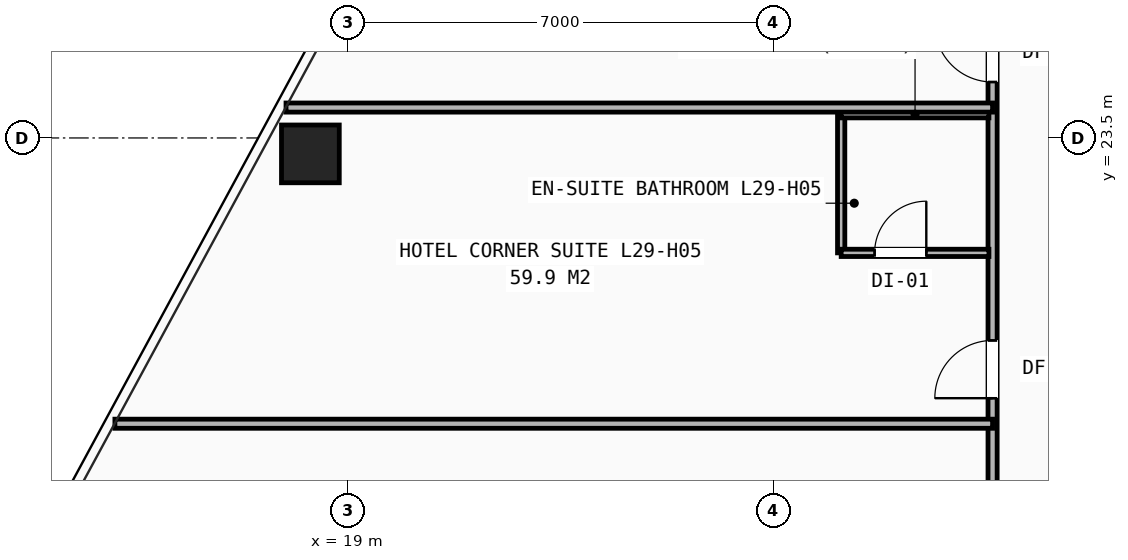
"""IFC4 building model, lengths in metres.
Left out: names, types, materials, properties, quantities, classifications, styles, units other than length and angle.
Written with IfcOpenShell. Run it as: python <this file> out.ifc"""

import sys

from ifc_helpers import new_model, si_unit, direction, frame, frame_2d, origin, origin_2d, place, context, subcontext, project, spatial, rectangle, hollow_rectangle, extrude, element, fill, save


model = new_model("IFC4")
c1 = context("Model", 3, precision=1e-05, world=origin(), true_north=direction((0.0, 1.0)))
c2 = subcontext(c1, "Body", "Model", "MODEL_VIEW")
j1 = project(units=[si_unit("LENGTHUNIT", "METRE"), si_unit("PLANEANGLEUNIT", "RADIAN")], contexts=[c1])
p1 = place(None, origin())
s1 = spatial("IfcSite", under=j1, at=p1, CompositionType="ELEMENT")
p2 = place(p1, origin())
s2 = spatial("IfcBuilding", under=s1, at=p2, CompositionType="ELEMENT")
p3 = place(p2, frame((0.0, 0.0, 102.2)))
s3 = spatial("IfcBuildingStorey", under=s2, at=p3, CompositionType="ELEMENT", Elevation=102.2)
p4 = place(p3, frame((18.381, 23.238, 0.0), z_axis=(0.0, 0.0, 1.0), x_axis=(1.0, 0.0, 0.0)))
e1 = element("IfcColumn", 1, at=p4, inside=s3, PredefinedType="COLUMN", context=c2, shape_type="SweptSolid", body=[
    extrude(hollow_rectangle(XDim=0.95, YDim=0.95, WallThickness=0.065, at=origin_2d()), origin(), (0.0, 0.0, 1.0), 3.2),
])
p5 = place(p3, frame((29.6, 14.1, 0.0), z_axis=(0.0, 0.0, 1.0), x_axis=(0.0, 1.0, 0.0)))
e2 = element("IfcWall", 2, at=p5, inside=s3, PredefinedType="PARTITIONING", context=c2, shape_type="SweptSolid", body=[
    extrude(rectangle(XDim=21.9, YDim=0.15, at=frame_2d((10.95, 0.0))), origin(), (0.0, 0.0, 1.0), 2.421),
])
p6 = place(p5, frame((0.42, 0.0, 0.0)))
e3 = element("IfcOpeningElement", 3, at=p6, cuts=e2, PredefinedType="OPENING", context=c2, shape_type="SweptSolid", body=[
    extrude(rectangle(XDim=0.95, YDim=2.1, at=frame_2d((0.475, 1.05))), frame((0.0, 0.085, 0.0), z_axis=(0.0, -1.0, 0.0), x_axis=(1.0, 0.0, 0.0)), (0.0, 0.0, 1.0), 0.17),
])
p7 = place(p5, frame((5.12, 0.0, 0.0)))
e4 = element("IfcOpeningElement", 4, at=p7, cuts=e2, PredefinedType="OPENING", context=c2, shape_type="SweptSolid", body=[
    extrude(rectangle(XDim=0.95, YDim=2.1, at=frame_2d((0.475, 1.05))), frame((0.0, 0.085, 0.0), z_axis=(0.0, -1.0, 0.0), x_axis=(1.0, 0.0, 0.0)), (0.0, 0.0, 1.0), 0.17),
])
p8 = place(p5, frame((10.32, 0.0, 0.0)))
e5 = element("IfcOpeningElement", 5, at=p8, cuts=e2, PredefinedType="OPENING", context=c2, shape_type="SweptSolid", body=[
    extrude(rectangle(XDim=0.95, YDim=2.1, at=frame_2d((0.475, 1.05))), frame((0.0, 0.085, 0.0), z_axis=(0.0, -1.0, 0.0), x_axis=(1.0, 0.0, 0.0)), (0.0, 0.0, 1.0), 0.17),
])
p9 = place(p5, frame((16.12, 0.0, 0.0)))
e6 = element("IfcOpeningElement", 6, at=p9, cuts=e2, PredefinedType="OPENING", context=c2, shape_type="SweptSolid", body=[
    extrude(rectangle(XDim=0.95, YDim=2.1, at=frame_2d((0.475, 1.05))), frame((0.0, 0.085, 0.0), z_axis=(0.0, -1.0, 0.0), x_axis=(1.0, 0.0, 0.0)), (0.0, 0.0, 1.0), 0.17),
])
p10 = place(p3, frame((15.166, 18.8, 0.0), z_axis=(0.0, 0.0, 1.0), x_axis=(1.0, 0.0, 0.0)))
e7 = element("IfcWall", 7, at=p10, inside=s3, PredefinedType="PARTITIONING", context=c2, shape_type="SweptSolid", body=[
    extrude(rectangle(XDim=14.434, YDim=0.15, at=frame_2d((7.217, 0.0))), origin(), (0.0, 0.0, 1.0), 2.258),
])
p11 = place(p3, frame((27.11, 21.61, 0.0), z_axis=(0.0, 0.0, 1.0), x_axis=(0.0, 1.0, 0.0)))
e8 = element("IfcWall", 8, at=p11, inside=s3, PredefinedType="PARTITIONING", context=c2, shape_type="SweptSolid", body=[
    extrude(rectangle(XDim=2.28, YDim=0.12, at=frame_2d((1.14, 0.0))), origin(), (0.0, 0.0, 1.0), 2.97),
])
p12 = place(p3, frame((27.11, 21.61, 0.0), z_axis=(0.0, 0.0, 1.0), x_axis=(1.0, 0.0, 0.0)))
e9 = element("IfcWall", 9, at=p12, inside=s3, PredefinedType="PARTITIONING", context=c2, shape_type="SweptSolid", body=[
    extrude(rectangle(XDim=2.43, YDim=0.12, at=frame_2d((1.215, 0.0))), origin(), (0.0, 0.0, 1.0), 2.97),
])
p13 = place(p12, frame((0.55, 0.0, 0.0)))
e10 = element("IfcOpeningElement", 10, at=p13, cuts=e9, PredefinedType="OPENING", context=c2, shape_type="SweptSolid", body=[
    extrude(rectangle(XDim=0.85, YDim=2.05, at=frame_2d((0.425, 1.025))), frame((0.0, 0.07, 0.0), z_axis=(0.0, -1.0, 0.0), x_axis=(1.0, 0.0, 0.0)), (0.0, 0.0, 1.0), 0.14),
])
p14 = place(p3, frame((27.11, 23.89, 0.0), z_axis=(0.0, 0.0, 1.0), x_axis=(1.0, 0.0, 0.0)))
e11 = element("IfcWall", 11, at=p14, inside=s3, PredefinedType="PARTITIONING", context=c2, shape_type="SweptSolid", body=[
    extrude(rectangle(XDim=2.43, YDim=0.12, at=frame_2d((1.215, 0.0))), origin(), (0.0, 0.0, 1.0), 2.97),
])
p15 = place(p3, frame((17.98, 24.0, 0.0), z_axis=(0.0, 0.0, 1.0), x_axis=(1.0, 0.0, 0.0)))
e12 = element("IfcWall", 12, at=p15, inside=s3, PredefinedType="PARTITIONING", context=c2, shape_type="SweptSolid", body=[
    extrude(rectangle(XDim=11.62, YDim=0.15, at=frame_2d((5.81, 0.0))), origin(), (0.0, 0.0, 1.0), 2.258),
])
p16 = place(p7, origin())
e13 = element("IfcDoor", 13, at=p16, inside=s3, OperationType="SINGLE_SWING_LEFT", PredefinedType="DOOR", context=c2, shape_type="SweptSolid", body=[
    extrude(rectangle(XDim=0.95, YDim=2.1, at=frame_2d((0.475, 1.05))), frame((0.0, 0.025, 0.0), z_axis=(0.0, -1.0, 0.0), x_axis=(1.0, 0.0, 0.0)), (0.0, 0.0, 1.0), 0.05),
])
fill(e4, e13)
p17 = place(p13, origin())
e14 = element("IfcDoor", 14, at=p17, inside=s3, OperationType="SINGLE_SWING_RIGHT", PredefinedType="DOOR", context=c2, shape_type="SweptSolid", body=[
    extrude(rectangle(XDim=0.85, YDim=2.05, at=frame_2d((0.425, 1.025))), frame((0.0, 0.025, 0.0), z_axis=(0.0, -1.0, 0.0), x_axis=(1.0, 0.0, 0.0)), (0.0, 0.0, 1.0), 0.05),
])
fill(e10, e14)
p18 = place(p8, origin())
e15 = element("IfcDoor", 15, at=p18, inside=s3, OperationType="SINGLE_SWING_RIGHT", PredefinedType="DOOR", context=c2, shape_type="SweptSolid", body=[
    extrude(rectangle(XDim=0.95, YDim=2.1, at=frame_2d((0.475, 1.05))), frame((0.0, 0.025, 0.0), z_axis=(0.0, -1.0, 0.0), x_axis=(1.0, 0.0, 0.0)), (0.0, 0.0, 1.0), 0.05),
])
fill(e5, e15)
save(model, sys.argv[1])
